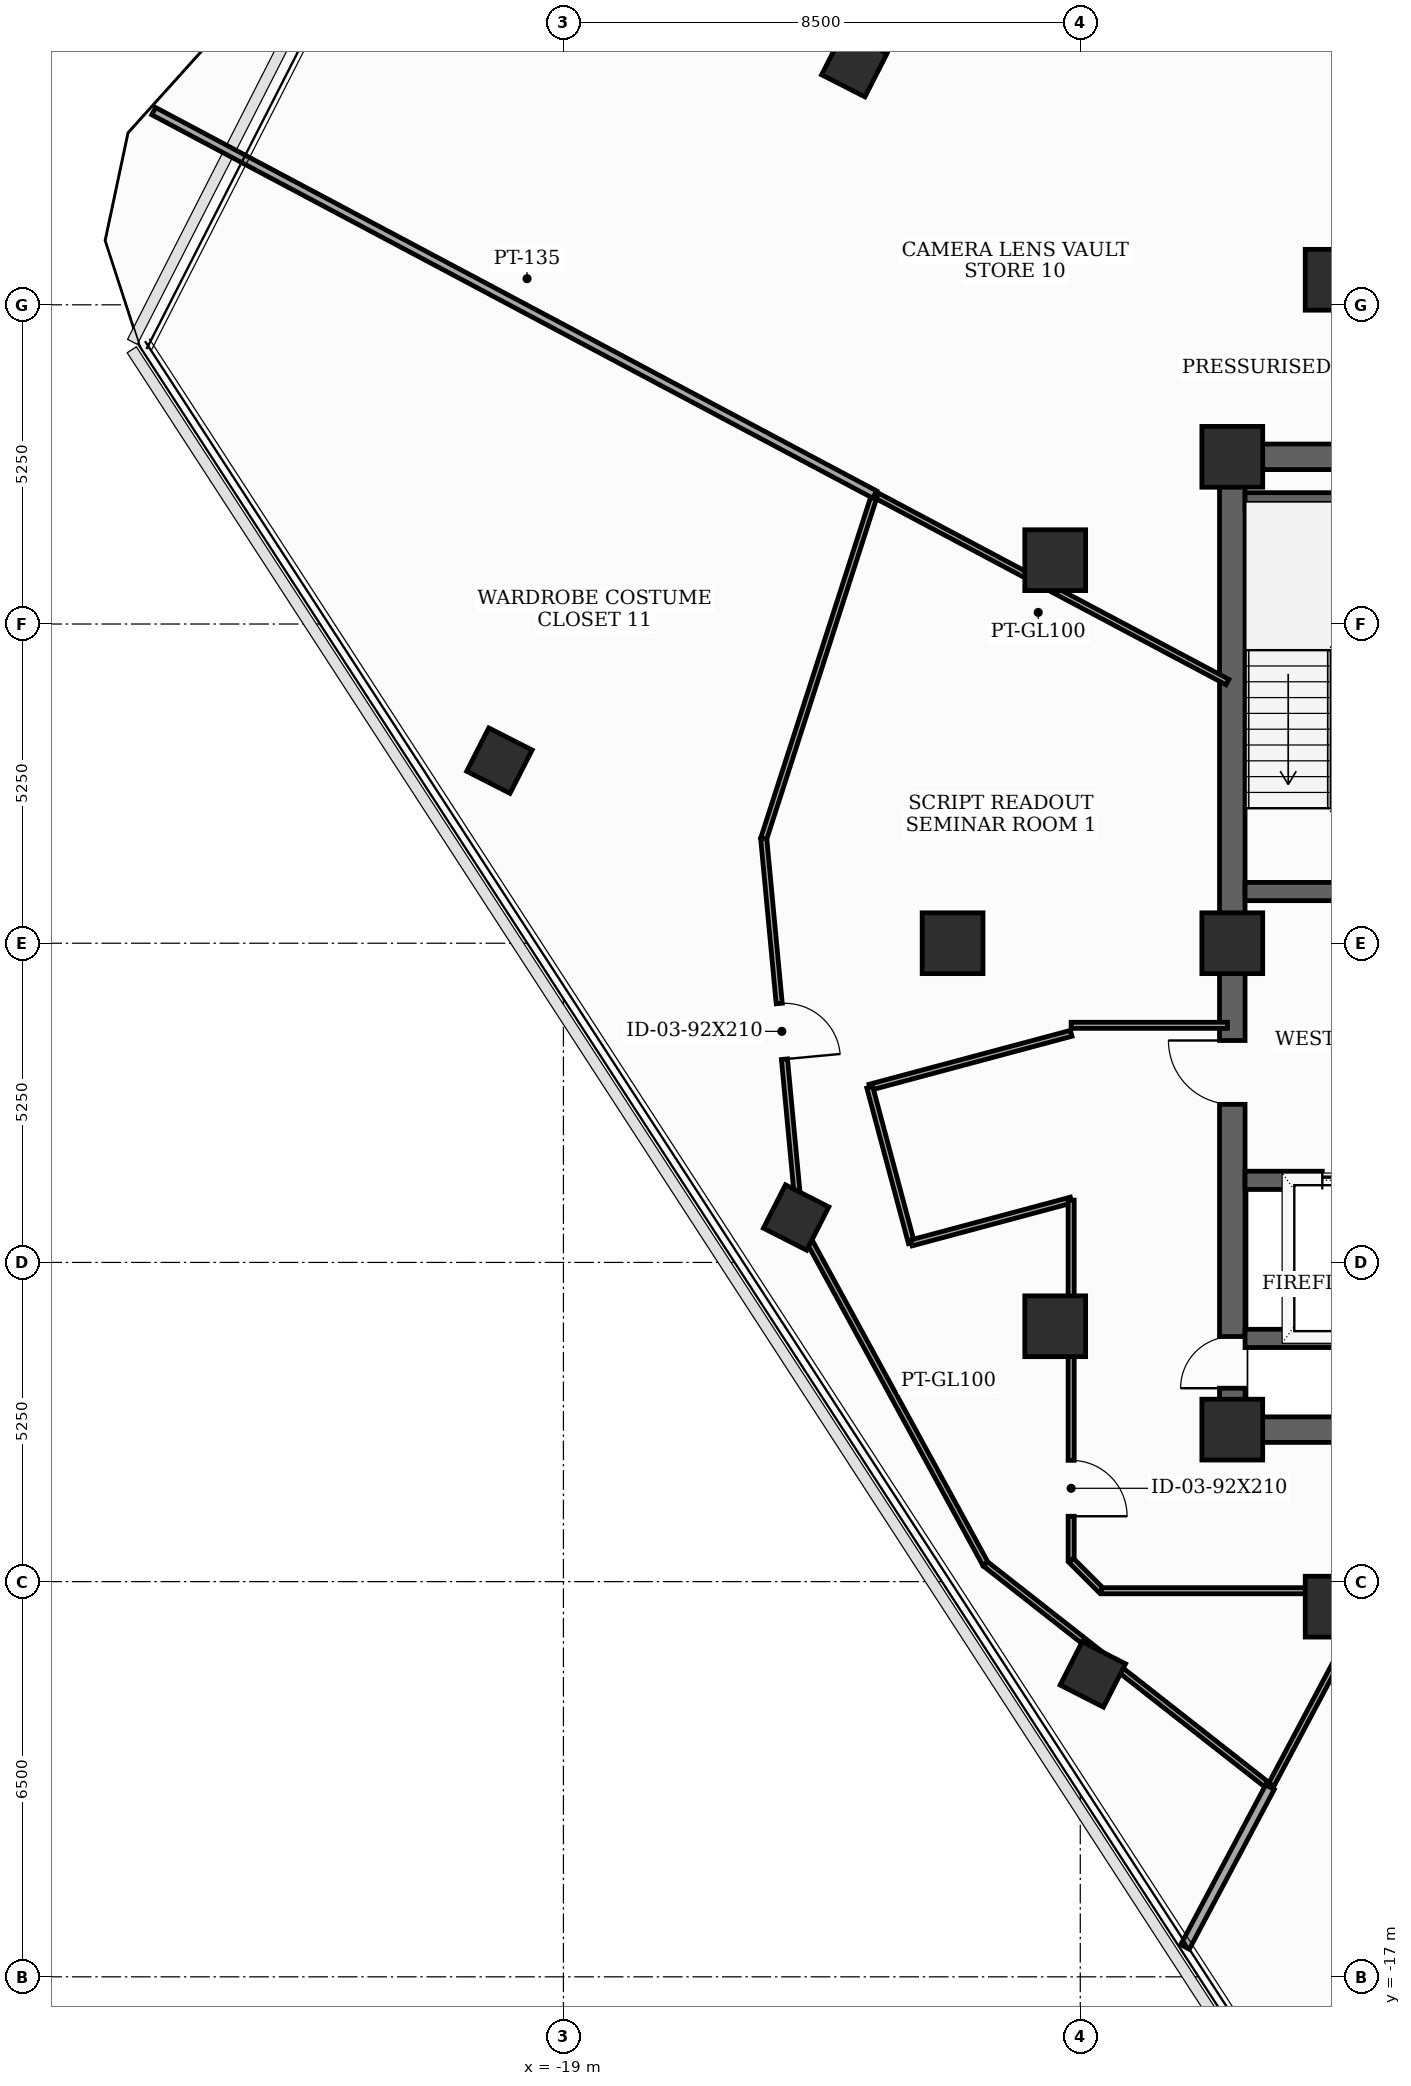
"""IFC4 building model, lengths in metres.
Left out: names, types, materials, properties, quantities, classifications, styles, units other than length and angle.
Written with IfcOpenShell. Run it as: python <this file> out.ifc"""

import sys

from ifc_helpers import new_model, si_unit, direction, frame, frame_2d, origin, origin_2d, place, context, subcontext, project, spatial, rectangle, extrude, element, fill, save


model = new_model("IFC4")
c1 = context("Model", 3, precision=1e-05, world=origin(), true_north=direction((0.0, 1.0)))
c2 = subcontext(c1, "Body", "Model", "MODEL_VIEW")
j1 = project(units=[si_unit("LENGTHUNIT", "METRE"), si_unit("PLANEANGLEUNIT", "RADIAN")], contexts=[c1])
p1 = place(None, origin())
s1 = spatial("IfcSite", under=j1, at=p1, CompositionType="ELEMENT")
p2 = place(p1, origin())
s2 = spatial("IfcBuilding", under=s1, at=p2, CompositionType="ELEMENT")
p3 = place(p2, frame((0.0, 0.0, 270.7)))
s3 = spatial("IfcBuildingStorey", under=s2, at=p3, CompositionType="ELEMENT", Elevation=270.7)
for number, where, z_axis, x_axis in (
    (1, (-8.0, -8.0, 0.0), (0.0, 0.0, 1.0), (1.0, 0.0, 0.0)),
    (2, (-8.0, 8.0, 0.0), (0.0, 0.0, 1.0), (1.0, 0.0, 0.0)),
    (3, (-8.0, 0.0, 0.0), (0.0, 0.0, 1.0), (1.0, 0.0, 0.0)),
    (4, (-6.3, 10.912, 0.0), (0.0, 0.0, 1.0), (1.0, 0.0, 0.0)),
    (5, (-10.912, 6.3, 0.0), (0.0, 0.0, 1.0), (1.0, 0.0, 0.0)),
    (6, (-12.6, 0.0, 0.0), (0.0, 0.0, 1.0), (1.0, 0.0, 0.0)),
    (7, (-10.912, -6.3, 0.0), (0.0, 0.0, 1.0), (1.0, 0.0, 0.0)),
    (8, (-6.3, -10.912, 0.0), (0.0, 0.0, 1.0), (1.0, 0.0, 0.0)),
):
    element("IfcColumn", number, at=place(p3, frame(where, z_axis=z_axis, x_axis=x_axis)), inside=s3, PredefinedType="COLUMN", context=c2, shape_type="SweptSolid", body=[
        extrude(rectangle(XDim=1.0, YDim=1.0, at=origin_2d()), origin(), (0.0, 0.0, 1.0), 3.7),
    ])
for number, where, z_axis, x_axis in (
    (9, (-14.216, 14.458, 0.0), (0.0, 0.0, 1.0), (0.454, 0.891, 0.0)),
    (10, (-20.053, 3.003, 0.0), (0.0, 0.0, 1.0), (0.454, 0.891, 0.0)),
    (11, (-15.173, -4.512, 0.0), (0.0, 0.0, 1.0), (0.454, 0.891, 0.0)),
    (12, (-10.293, -12.026, 0.0), (0.0, 0.0, 1.0), (0.454, 0.891, 0.0)),
):
    element("IfcColumn", number, at=place(p3, frame(where, z_axis=z_axis, x_axis=x_axis)), inside=s3, PredefinedType="COLUMN", context=c2, shape_type="SweptSolid", body=[
        extrude(rectangle(XDim=0.8, YDim=0.8, at=origin_2d()), origin(), (0.0, 0.0, 1.0), 3.7),
    ])
p4 = place(p3, frame((-6.14, 13.98, 0.0), z_axis=(0.0, 0.0, 1.0), x_axis=(-0.052350224103, 0.998628786905, 0.0)))
e13 = element("IfcWall", 13, at=p4, inside=s3, PredefinedType="SOLIDWALL", context=c2, shape_type="SweptSolid", body=[
    extrude(rectangle(XDim=2.15, YDim=0.26, at=frame_2d((1.075, 0.0))), origin(), (0.0, 0.0, 1.0), 3.5),
])
p5 = place(p3, frame((-8.0, -8.0, 0.0), z_axis=(0.0, 0.0, 1.0), x_axis=(0.0, 1.0, 0.0)))
e14 = element("IfcWall", 14, at=p5, inside=s3, PredefinedType="SHEAR", context=c2, shape_type="SweptSolid", body=[
    extrude(rectangle(XDim=16.0, YDim=0.42, at=frame_2d((8.0, 0.0))), origin(), (0.0, 0.0, 1.0), 3.5),
])
p6 = place(p5, frame((0.681, 0.0, 0.0)))
e15 = element("IfcOpeningElement", 15, at=p6, cuts=e14, PredefinedType="OPENING", context=c2, shape_type="SweptSolid", body=[
    extrude(rectangle(XDim=0.85, YDim=2.02, at=frame_2d((0.425, 1.01))), frame((0.0, 0.22, 0.0), z_axis=(0.0, -1.0, 0.0), x_axis=(1.0, 0.0, 0.0)), (0.0, 0.0, 1.0), 0.44),
])
p7 = place(p5, frame((5.35, 0.0, 0.0)))
e16 = element("IfcOpeningElement", 16, at=p7, cuts=e14, PredefinedType="OPENING", context=c2, shape_type="SweptSolid", body=[
    extrude(rectangle(XDim=1.05, YDim=2.15, at=frame_2d((0.525, 1.075))), frame((0.0, 0.22, 0.0), z_axis=(0.0, -1.0, 0.0), x_axis=(1.0, 0.0, 0.0)), (0.0, 0.0, 1.0), 0.44),
])
p8 = place(p3, frame((-8.0, -8.0, 0.0), z_axis=(0.0, 0.0, 1.0), x_axis=(1.0, 0.0, 0.0)))
e17 = element("IfcWall", 17, at=p8, inside=s3, PredefinedType="SHEAR", context=c2, shape_type="SweptSolid", body=[
    extrude(rectangle(XDim=16.0, YDim=0.42, at=frame_2d((8.0, 0.0))), origin(), (0.0, 0.0, 1.0), 3.5),
])
p9 = place(p8, frame((4.35, 0.0, 0.0)))
e18 = element("IfcOpeningElement", 18, at=p9, cuts=e17, PredefinedType="OPENING", context=c2, shape_type="SweptSolid", body=[
    extrude(rectangle(XDim=0.85, YDim=2.02, at=frame_2d((0.425, 1.01))), frame((0.0, 0.22, 0.0), z_axis=(0.0, -1.0, 0.0), x_axis=(1.0, 0.0, 0.0)), (0.0, 0.0, 1.0), 0.44),
])
p10 = place(p8, frame((6.49, 0.0, 0.0)))
e19 = element("IfcOpeningElement", 19, at=p10, cuts=e17, PredefinedType="OPENING", context=c2, shape_type="SweptSolid", body=[
    extrude(rectangle(XDim=0.85, YDim=2.02, at=frame_2d((0.425, 1.01))), frame((0.0, 0.22, 0.0), z_axis=(0.0, -1.0, 0.0), x_axis=(1.0, 0.0, 0.0)), (0.0, 0.0, 1.0), 0.44),
])
p11 = place(p8, frame((8.69, 0.0, 0.0)))
e20 = element("IfcOpeningElement", 20, at=p11, cuts=e17, PredefinedType="OPENING", context=c2, shape_type="SweptSolid", body=[
    extrude(rectangle(XDim=0.85, YDim=2.02, at=frame_2d((0.425, 1.01))), frame((0.0, 0.22, 0.0), z_axis=(0.0, -1.0, 0.0), x_axis=(1.0, 0.0, 0.0)), (0.0, 0.0, 1.0), 0.44),
])
p12 = place(p8, frame((10.8, 0.0, 0.0)))
e21 = element("IfcOpeningElement", 21, at=p12, cuts=e17, PredefinedType="OPENING", context=c2, shape_type="SweptSolid", body=[
    extrude(rectangle(XDim=0.85, YDim=2.02, at=frame_2d((0.425, 1.01))), frame((0.0, 0.22, 0.0), z_axis=(0.0, -1.0, 0.0), x_axis=(1.0, 0.0, 0.0)), (0.0, 0.0, 1.0), 0.44),
])
p13 = place(p3, frame((-8.0, 8.0, 0.0), z_axis=(0.0, 0.0, 1.0), x_axis=(1.0, 0.0, 0.0)))
e22 = element("IfcWall", 22, at=p13, inside=s3, PredefinedType="SHEAR", context=c2, shape_type="SweptSolid", body=[
    extrude(rectangle(XDim=16.0, YDim=0.42, at=frame_2d((8.0, 0.0))), origin(), (0.0, 0.0, 1.0), 3.5),
])
p14 = place(p13, frame((7.1, 0.0, 0.0)))
e23 = element("IfcOpeningElement", 23, at=p14, cuts=e22, PredefinedType="OPENING", context=c2, shape_type="SweptSolid", body=[
    extrude(rectangle(XDim=1.8, YDim=2.15, at=frame_2d((0.9, 1.075))), frame((0.0, 0.22, 0.0), z_axis=(0.0, -1.0, 0.0), x_axis=(1.0, 0.0, 0.0)), (0.0, 0.0, 1.0), 0.44),
])
p15 = place(p3, frame((-7.79, 0.85, 0.0), z_axis=(0.0, 0.0, 1.0), x_axis=(1.0, 0.0, 0.0)))
e24 = element("IfcWall", 24, at=p15, inside=s3, PredefinedType="SHEAR", context=c2, shape_type="SweptSolid", body=[
    extrude(rectangle(XDim=3.34, YDim=0.3, at=frame_2d((1.67, 0.0))), origin(), (0.0, 0.0, 1.0), 3.5),
])
p16 = place(p15, frame((1.85, 0.0, 0.0)))
e25 = element("IfcOpeningElement", 25, at=p16, cuts=e24, PredefinedType="OPENING", context=c2, shape_type="SweptSolid", body=[
    extrude(rectangle(XDim=1.05, YDim=2.15, at=frame_2d((0.525, 1.075))), frame((0.0, 0.16, 0.0), z_axis=(0.0, -1.0, 0.0), x_axis=(1.0, 0.0, 0.0)), (0.0, 0.0, 1.0), 0.32),
])
p17 = place(p3, frame((-7.79, 7.26, 0.0), z_axis=(0.0, 0.0, 1.0), x_axis=(1.0, 0.0, 0.0)))
e26 = element("IfcWall", 26, at=p17, inside=s3, PredefinedType="SHEAR", context=c2, shape_type="SweptSolid", body=[
    extrude(rectangle(XDim=3.34, YDim=0.3, at=frame_2d((1.67, 0.0))), origin(), (0.0, 0.0, 1.0), 3.5),
])
p18 = place(p3, frame((-7.79, -3.9, 0.0), z_axis=(0.0, 0.0, 1.0), x_axis=(1.0, 0.0, 0.0)))
e27 = element("IfcWall", 27, at=p18, inside=s3, PredefinedType="SHEAR", context=c2, shape_type="SweptSolid", body=[
    extrude(rectangle(XDim=3.34, YDim=0.3, at=frame_2d((1.67, 0.0))), origin(), (0.0, 0.0, 1.0), 3.5),
])
p19 = place(p18, frame((1.27, 0.0, 0.0)))
e28 = element("IfcOpeningElement", 28, at=p19, cuts=e27, PredefinedType="OPENING", context=c2, shape_type="SweptSolid", body=[
    extrude(rectangle(XDim=1.1, YDim=2.1, at=frame_2d((0.55, 1.05))), frame((0.0, 0.16, 0.0), z_axis=(0.0, -1.0, 0.0), x_axis=(1.0, 0.0, 0.0)), (0.0, 0.0, 1.0), 0.32),
])
p20 = place(p3, frame((-7.79, -6.5, 0.0), z_axis=(0.0, 0.0, 1.0), x_axis=(1.0, 0.0, 0.0)))
e29 = element("IfcWall", 29, at=p20, inside=s3, PredefinedType="SHEAR", context=c2, shape_type="SweptSolid", body=[
    extrude(rectangle(XDim=3.34, YDim=0.3, at=frame_2d((1.67, 0.0))), origin(), (0.0, 0.0, 1.0), 3.5),
])
p21 = place(p3, frame((-8.08, -1.35, 0.0), z_axis=(0.0, 0.0, 1.0), x_axis=(-1.0, 0.0, 0.0)))
e30 = element("IfcWall", 30, at=p21, inside=s3, PredefinedType="MOVABLE", context=c2, shape_type="SweptSolid", body=[
    extrude(rectangle(XDim=2.57, YDim=0.1, at=frame_2d((1.285, 0.0))), origin(), (0.0, 0.0, 1.0), 2.885),
])
p22 = place(p3, frame((-10.65, -1.482, 0.0), z_axis=(0.0, 0.0, 1.0), x_axis=(-0.965961397105, -0.2586862565, 0.0)))
e31 = element("IfcWall", 31, at=p22, inside=s3, PredefinedType="MOVABLE", context=c2, shape_type="SweptSolid", body=[
    extrude(rectangle(XDim=3.429, YDim=0.1, at=frame_2d((1.714, 0.0))), origin(), (0.0, 0.0, 1.0), 2.885),
])
p23 = place(p3, frame((-13.962, -2.369, 0.0), z_axis=(0.0, 0.0, 1.0), x_axis=(0.258413725385, -0.966034340245, 0.0)))
e32 = element("IfcWall", 32, at=p23, inside=s3, PredefinedType="MOVABLE", context=c2, shape_type="SweptSolid", body=[
    extrude(rectangle(XDim=2.65, YDim=0.1, at=frame_2d((1.325, 0.0))), origin(), (0.0, 0.0, 1.0), 3.5),
])
p24 = place(p3, frame((-13.277, -4.929, 0.0), z_axis=(0.0, 0.0, 1.0), x_axis=(0.965934830229, 0.258785439601, 0.0)))
e33 = element("IfcWall", 33, at=p24, inside=s3, PredefinedType="MOVABLE", context=c2, shape_type="SweptSolid", body=[
    extrude(rectangle(XDim=2.72, YDim=0.1, at=frame_2d((1.36, 0.0))), origin(), (0.0, 0.0, 1.0), 2.885),
])
p25 = place(p3, frame((-10.65, -4.225, 0.0), z_axis=(0.0, 0.0, 1.0), x_axis=(0.0, -1.0, 0.0)))
e34 = element("IfcWall", 34, at=p25, inside=s3, PredefinedType="MOVABLE", context=c2, shape_type="SweptSolid", body=[
    extrude(rectangle(XDim=5.925, YDim=0.1, at=frame_2d((2.962, 0.0))), origin(), (0.0, 0.0, 1.0), 2.885),
])
p26 = place(p25, frame((4.28, 0.0, 0.0)))
e35 = element("IfcOpeningElement", 35, at=p26, cuts=e34, PredefinedType="OPENING", context=c2, shape_type="SweptSolid", body=[
    extrude(rectangle(XDim=0.92, YDim=2.1, at=frame_2d((0.46, 1.05))), frame((0.0, 0.06, 0.0), z_axis=(0.0, -1.0, 0.0), x_axis=(1.0, 0.0, 0.0)), (0.0, 0.0, 1.0), 0.12),
])
p27 = place(p3, frame((-10.65, -10.15, 0.0), z_axis=(0.0, 0.0, 1.0), x_axis=(0.707106781187, -0.707106781187, 0.0)))
e36 = element("IfcWall", 36, at=p27, inside=s3, PredefinedType="MOVABLE", context=c2, shape_type="SweptSolid", body=[
    extrude(rectangle(XDim=0.707, YDim=0.1, at=frame_2d((0.354, 0.0))), origin(), (0.0, 0.0, 1.0), 3.5),
])
p28 = place(p3, frame((-10.15, -10.65, 0.0), z_axis=(0.0, 0.0, 1.0), x_axis=(1.0, 0.0, 0.0)))
e37 = element("IfcWall", 37, at=p28, inside=s3, PredefinedType="MOVABLE", context=c2, shape_type="SweptSolid", body=[
    extrude(rectangle(XDim=4.487, YDim=0.1, at=frame_2d((2.243, 0.0))), origin(), (0.0, 0.0, 1.0), 2.885),
])
p29 = place(p3, frame((-7.38, -13.881, 0.0), z_axis=(0.0, 0.0, 1.0), x_axis=(0.469202384294, 0.883090664979, 0.0)))
e38 = element("IfcWall", 38, at=p29, inside=s3, PredefinedType="MOVABLE", context=c2, shape_type="SweptSolid", body=[
    extrude(rectangle(XDim=3.659, YDim=0.1, at=frame_2d((1.83, 0.0))), origin(), (0.0, 0.0, 1.0), 2.885),
])
p30 = place(p3, frame((-8.08, 4.296, 0.0), z_axis=(0.0, 0.0, 1.0), x_axis=(-0.882977594756, 0.469415133074, 0.0)))
e39 = element("IfcWall", 39, at=p30, inside=s3, PredefinedType="MOVABLE", context=c2, shape_type="SweptSolid", body=[
    extrude(rectangle(XDim=6.57, YDim=0.1, at=frame_2d((3.285, 0.0))), origin(), (0.0, 0.0, 1.0), 2.885),
])
p31 = place(p3, frame((-13.881, 7.38, 0.0), z_axis=(0.0, 0.0, 1.0), x_axis=(-0.306876830036, -0.951749237555, 0.0)))
e40 = element("IfcWall", 40, at=p31, inside=s3, PredefinedType="MOVABLE", context=c2, shape_type="SweptSolid", body=[
    extrude(rectangle(XDim=5.947, YDim=0.1, at=frame_2d((2.973, 0.0))), origin(), (0.0, 0.0, 1.0), 3.185),
])
p32 = place(p3, frame((-15.706, 1.72, 0.0), z_axis=(0.0, 0.0, 1.0), x_axis=(0.093602035829, -0.995609692042, 0.0)))
e41 = element("IfcWall", 41, at=p32, inside=s3, PredefinedType="MOVABLE", context=c2, shape_type="SweptSolid", body=[
    extrude(rectangle(XDim=6.367, YDim=0.1, at=frame_2d((3.183, 0.0))), origin(), (0.0, 0.0, 1.0), 3.035),
])
p33 = place(p32, frame((2.723, 0.0, 0.0)))
e42 = element("IfcOpeningElement", 42, at=p33, cuts=e41, PredefinedType="OPENING", context=c2, shape_type="SweptSolid", body=[
    extrude(rectangle(XDim=0.92, YDim=2.1, at=frame_2d((0.46, 1.05))), frame((0.0, 0.06, 0.0), z_axis=(0.0, -1.0, 0.0), x_axis=(1.0, 0.0, 0.0)), (0.0, 0.0, 1.0), 0.12),
])
p34 = place(p3, frame((-15.11, -4.619, 0.0), z_axis=(0.0, 0.0, 1.0), x_axis=(0.47908041906, -0.877771013461, 0.0)))
e43 = element("IfcWall", 43, at=p34, inside=s3, PredefinedType="MOVABLE", context=c2, shape_type="SweptSolid", body=[
    extrude(rectangle(XDim=6.368, YDim=0.1, at=frame_2d((3.184, 0.0))), origin(), (0.0, 0.0, 1.0), 3.035),
])
p35 = place(p3, frame((-12.059, -10.209, 0.0), z_axis=(0.0, 0.0, 1.0), x_axis=(0.786677127243, -0.617364638989, 0.0)))
e44 = element("IfcWall", 44, at=p35, inside=s3, PredefinedType="MOVABLE", context=c2, shape_type="SweptSolid", body=[
    extrude(rectangle(XDim=5.948, YDim=0.1, at=frame_2d((2.974, 0.0))), origin(), (0.0, 0.0, 1.0), 3.035),
])
p36 = place(p3, frame((-7.38, -13.881, 0.0), z_axis=(0.0, 0.0, 1.0), x_axis=(-0.469646984778, -0.882854296976, 0.0)))
e45 = element("IfcWall", 45, at=p36, inside=s3, PredefinedType="PARTITIONING", context=c2, shape_type="SweptSolid", body=[
    extrude(rectangle(XDim=2.976, YDim=0.16, at=frame_2d((1.488, 0.0))), origin(), (0.0, 0.0, 1.0), 3.035),
])
p37 = place(p3, frame((-25.738, 13.685, 0.0), z_axis=(0.0, 0.0, 1.0), x_axis=(0.882921457353, -0.469520713222, 0.0)))
e46 = element("IfcWall", 46, at=p37, inside=s3, PredefinedType="PARTITIONING", context=c2, shape_type="SweptSolid", body=[
    extrude(rectangle(XDim=13.429, YDim=0.135, at=frame_2d((6.715, 0.0))), origin(), (0.0, 0.0, 1.0), 3.035),
])
p38 = place(p6, origin())
e47 = element("IfcDoor", 47, at=p38, inside=s3, OperationType="SINGLE_SWING_LEFT", PredefinedType="TRAPDOOR", context=c2, shape_type="SweptSolid", body=[
    extrude(rectangle(XDim=0.85, YDim=2.02, at=frame_2d((0.425, 1.01))), frame((0.0, 0.025, 0.0), z_axis=(0.0, -1.0, 0.0), x_axis=(1.0, 0.0, 0.0)), (0.0, 0.0, 1.0), 0.05),
])
fill(e15, e47)
p39 = place(p7, origin())
e48 = element("IfcDoor", 48, at=p39, inside=s3, OperationType="SINGLE_SWING_RIGHT", PredefinedType="DOOR", context=c2, shape_type="SweptSolid", body=[
    extrude(rectangle(XDim=1.05, YDim=2.15, at=frame_2d((0.525, 1.075))), frame((0.0, 0.025, 0.0), z_axis=(0.0, -1.0, 0.0), x_axis=(1.0, 0.0, 0.0)), (0.0, 0.0, 1.0), 0.05),
])
fill(e16, e48)
p40 = place(p19, origin())
e49 = element("IfcDoor", 49, at=p40, inside=s3, OperationType="SLIDING_TO_LEFT", PredefinedType="DOOR", context=c2, shape_type="SweptSolid", body=[
    extrude(rectangle(XDim=1.1, YDim=2.1, at=frame_2d((0.55, 1.05))), frame((0.0, 0.025, 0.0), z_axis=(0.0, -1.0, 0.0), x_axis=(1.0, 0.0, 0.0)), (0.0, 0.0, 1.0), 0.05),
])
fill(e28, e49)
p41 = place(p26, origin())
e50 = element("IfcDoor", 50, at=p41, inside=s3, OperationType="SINGLE_SWING_RIGHT", PredefinedType="DOOR", context=c2, shape_type="SweptSolid", body=[
    extrude(rectangle(XDim=0.92, YDim=2.1, at=frame_2d((0.46, 1.05))), frame((0.0, 0.025, 0.0), z_axis=(0.0, -1.0, 0.0), x_axis=(1.0, 0.0, 0.0)), (0.0, 0.0, 1.0), 0.05),
])
fill(e35, e50)
p42 = place(p33, origin())
e51 = element("IfcDoor", 51, at=p42, inside=s3, OperationType="SINGLE_SWING_RIGHT", PredefinedType="DOOR", context=c2, shape_type="SweptSolid", body=[
    extrude(rectangle(XDim=0.92, YDim=2.1, at=frame_2d((0.46, 1.05))), frame((0.0, 0.025, 0.0), z_axis=(0.0, -1.0, 0.0), x_axis=(1.0, 0.0, 0.0)), (0.0, 0.0, 1.0), 0.05),
])
fill(e42, e51)
save(model, sys.argv[1])
